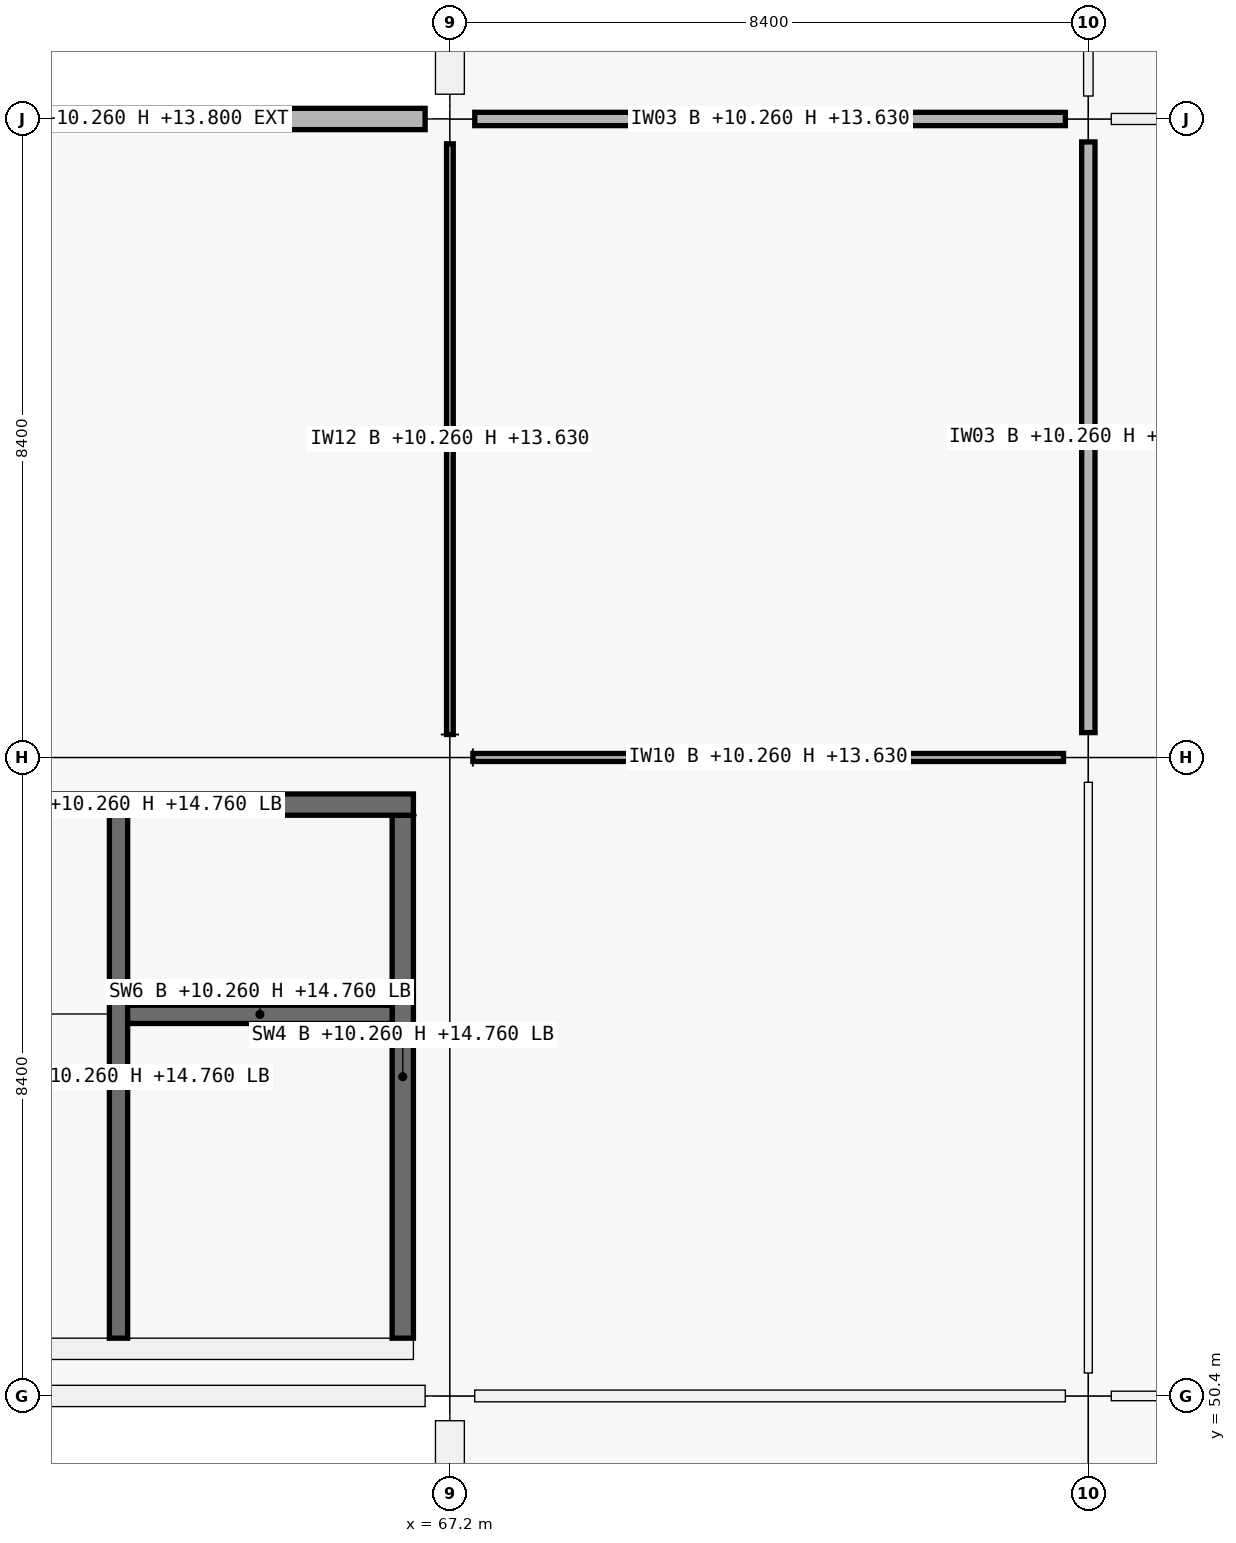
"""IFC4 building model, lengths in metres.
Left out: names, types, materials, properties, quantities, classifications, styles, units other than length and angle.
Written with IfcOpenShell. Run it as: python <this file> out.ifc"""

import sys

from ifc_helpers import new_model, si_unit, direction, frame, frame_2d, origin, origin_2d, place, context, subcontext, project, spatial, rectangle, extrude, element, fill, save


model = new_model("IFC4")
c1 = context("Model", 3, precision=1e-05, world=origin(), true_north=direction((0.0, 1.0)))
c2 = subcontext(c1, "Body", "Model", "MODEL_VIEW")
j1 = project(units=[si_unit("LENGTHUNIT", "METRE"), si_unit("PLANEANGLEUNIT", "RADIAN")], contexts=[c1])
p1 = place(None, origin())
s1 = spatial("IfcSite", under=j1, at=p1, CompositionType="ELEMENT")
p2 = place(p1, origin())
s2 = spatial("IfcBuilding", under=s1, at=p2, CompositionType="ELEMENT")
p3 = place(p2, frame((0.0, 0.0, 10.26)))
s3 = spatial("IfcBuildingStorey", under=s2, at=p3, CompositionType="ELEMENT", Elevation=10.26)
p4 = place(p3, frame((67.2, 50.4, 0.0), z_axis=(0.0, 0.0, 1.0), x_axis=(1.0, 0.0, 0.0)))
e1 = element("IfcColumn", 1, at=p4, inside=s3, PredefinedType="COLUMN", context=c2, shape_type="SweptSolid", body=[
    extrude(rectangle(XDim=0.65, YDim=0.65, at=origin_2d()), origin(), (0.0, 0.0, 1.0), 4.5),
])
p5 = place(p3, frame((67.2, 58.8, 0.0), z_axis=(0.0, 0.0, 1.0), x_axis=(1.0, 0.0, 0.0)))
e2 = element("IfcColumn", 2, at=p5, inside=s3, PredefinedType="COLUMN", context=c2, shape_type="SweptSolid", body=[
    extrude(rectangle(XDim=0.6, YDim=0.6, at=origin_2d()), origin(), (0.0, 0.0, 1.0), 4.5),
])
p6 = place(p3, frame((67.2, 67.2, 0.0), z_axis=(0.0, 0.0, 1.0), x_axis=(1.0, 0.0, 0.0)))
e3 = element("IfcColumn", 3, at=p6, inside=s3, PredefinedType="COLUMN", context=c2, shape_type="SweptSolid", body=[
    extrude(rectangle(XDim=0.65, YDim=0.65, at=origin_2d()), origin(), (0.0, 0.0, 1.0), 4.5),
])
p7 = place(p3, frame((75.6, 50.4, 0.0), z_axis=(0.0, 0.0, 1.0), x_axis=(1.0, 0.0, 0.0)))
e4 = element("IfcColumn", 4, at=p7, inside=s3, PredefinedType="COLUMN", context=c2, shape_type="SweptSolid", body=[
    extrude(rectangle(XDim=0.6, YDim=0.6, at=origin_2d()), origin(), (0.0, 0.0, 1.0), 4.5),
])
p8 = place(p3, frame((75.6, 58.8, -0.3), z_axis=(0.0, 0.0, 1.0), x_axis=(1.0, 0.0, 0.0)))
e5 = element("IfcColumn", 5, at=p8, inside=s3, PredefinedType="COLUMN", context=c2, shape_type="SweptSolid", body=[
    extrude(rectangle(XDim=0.65, YDim=0.65, at=origin_2d()), origin(), (0.0, 0.0, 1.0), 4.8),
])
p9 = place(p3, frame((75.6, 67.2, 0.0), z_axis=(0.0, 0.0, 1.0), x_axis=(1.0, 0.0, 0.0)))
e6 = element("IfcColumn", 6, at=p9, inside=s3, PredefinedType="COLUMN", context=c2, shape_type="SweptSolid", body=[
    extrude(rectangle(XDim=0.6, YDim=0.6, at=origin_2d()), origin(), (0.0, 0.0, 1.0), 4.5),
])
p10 = place(p3, frame((66.874, 50.4, 0.0), z_axis=(0.0, 0.0, 1.0), x_axis=(-1.0, 0.0, 0.0)))
e7 = element("IfcWall", 7, at=p10, inside=s3, PredefinedType="SOLIDWALL", context=c2, shape_type="SweptSolid", body=[
    extrude(rectangle(XDim=7.773, YDim=0.28, at=frame_2d((3.886, 0.0))), origin(), (0.0, 0.0, 1.0), 3.54),
])
p11 = place(p3, frame((59.151, 67.2, 0.0), z_axis=(0.0, 0.0, 1.0), x_axis=(1.0, 0.0, 0.0)))
e8 = element("IfcWall", 8, at=p11, inside=s3, PredefinedType="SOLIDWALL", context=c2, shape_type="SweptSolid", body=[
    extrude(rectangle(XDim=7.723, YDim=0.28, at=frame_2d((3.862, 0.0))), origin(), (0.0, 0.0, 1.0), 3.54),
])
p12 = place(p11, frame((2.261, 0.0, 0.9)))
e9 = element("IfcOpeningElement", 9, at=p12, cuts=e8, PredefinedType="OPENING", context=c2, shape_type="SweptSolid", body=[
    extrude(rectangle(XDim=3.2, YDim=1.75, at=frame_2d((1.6, 0.875))), frame((0.0, 0.14, 0.0), z_axis=(0.0, -1.0, 0.0), x_axis=(1.0, 0.0, 0.0)), (0.0, 0.0, 1.0), 0.28),
])
p13 = place(p3, frame((67.2, 42.301, 0.0), z_axis=(0.0, 0.0, 1.0), x_axis=(0.0, 1.0, 0.0)))
e10 = element("IfcWall", 10, at=p13, inside=s3, PredefinedType="SOLIDWALL", context=c2, shape_type="SweptSolid", body=[
    extrude(rectangle(XDim=7.773, YDim=0.38, at=frame_2d((3.886, 0.0))), origin(), (0.0, 0.0, 1.0), 3.54),
])
p14 = place(p3, frame((67.2, 67.526, 0.0), z_axis=(0.0, 0.0, 1.0), x_axis=(0.0, 1.0, 0.0)))
e11 = element("IfcWall", 11, at=p14, inside=s3, PredefinedType="SOLIDWALL", context=c2, shape_type="SweptSolid", body=[
    extrude(rectangle(XDim=7.773, YDim=0.38, at=frame_2d((3.887, 0.0))), origin(), (0.0, 0.0, 1.0), 3.54),
])
for number, where, z_axis, x_axis in (
    (12, (66.72, 51.02, 0.0), (0.0, 0.0, 1.0), (-1.0, 0.0, 0.0)),
    (13, (59.28, 58.18, 0.0), (0.0, 0.0, 1.0), (1.0, 0.0, 0.0)),
):
    element("IfcWall", number, at=place(p3, frame(where, z_axis=z_axis, x_axis=x_axis)), inside=s3, PredefinedType="SHEAR", context=c2, shape_type="SweptSolid", body=[
        extrude(rectangle(XDim=7.44, YDim=0.28, at=frame_2d((3.72, 0.0))), origin(), (0.0, 0.0, 1.0), 4.5),
    ])
p15 = place(p3, frame((66.58, 58.04, 0.0), z_axis=(0.0, 0.0, 1.0), x_axis=(0.0, -1.0, 0.0)))
e14 = element("IfcWall", 14, at=p15, inside=s3, PredefinedType="SHEAR", context=c2, shape_type="SweptSolid", body=[
    extrude(rectangle(XDim=6.88, YDim=0.28, at=frame_2d((3.44, 0.0))), origin(), (0.0, 0.0, 1.0), 4.5),
])
p16 = place(p15, frame((3.99, 0.0, 0.0)))
e15 = element("IfcOpeningElement", 15, at=p16, cuts=e14, PredefinedType="OPENING", context=c2, shape_type="SweptSolid", body=[
    extrude(rectangle(XDim=1.5, YDim=2.15, at=frame_2d((0.75, 1.075))), frame((0.0, 0.14, 0.0), z_axis=(0.0, -1.0, 0.0), x_axis=(1.0, 0.0, 0.0)), (0.0, 0.0, 1.0), 0.28),
])
p17 = place(p3, frame((62.84, 51.16, 0.0), z_axis=(0.0, 0.0, 1.0), x_axis=(0.0, 1.0, 0.0)))
e16 = element("IfcWall", 16, at=p17, inside=s3, PredefinedType="SHEAR", context=c2, shape_type="SweptSolid", body=[
    extrude(rectangle(XDim=6.88, YDim=0.24, at=frame_2d((3.44, 0.0))), origin(), (0.0, 0.0, 1.0), 4.5),
])
p18 = place(p17, frame((0.12, 0.0, 0.0)))
e17 = element("IfcOpeningElement", 17, at=p18, cuts=e16, PredefinedType="OPENING", context=c2, shape_type="SweptSolid", body=[
    extrude(rectangle(XDim=1.0, YDim=2.15, at=frame_2d((0.5, 1.075))), frame((0.0, 0.12, 0.0), z_axis=(0.0, -1.0, 0.0), x_axis=(1.0, 0.0, 0.0)), (0.0, 0.0, 1.0), 0.24),
])
p19 = place(p3, frame((62.96, 55.42, 0.0), z_axis=(0.0, 0.0, 1.0), x_axis=(1.0, 0.0, 0.0)))
e18 = element("IfcWall", 18, at=p19, inside=s3, PredefinedType="SHEAR", context=c2, shape_type="SweptSolid", body=[
    extrude(rectangle(XDim=3.48, YDim=0.24, at=frame_2d((1.74, 0.0))), origin(), (0.0, 0.0, 1.0), 4.5),
])
p20 = place(p19, frame((1.19, 0.0, 0.0)))
e19 = element("IfcOpeningElement", 19, at=p20, cuts=e18, PredefinedType="OPENING", context=c2, shape_type="SweptSolid", body=[
    extrude(rectangle(XDim=1.1, YDim=2.15, at=frame_2d((0.55, 1.075))), frame((0.0, 0.12, 0.0), z_axis=(0.0, -1.0, 0.0), x_axis=(1.0, 0.0, 0.0)), (0.0, 0.0, 1.0), 0.24),
])
p21 = place(p3, frame((67.527, 50.4, 0.0), z_axis=(0.0, 0.0, 1.0), x_axis=(1.0, 0.0, 0.0)))
e20 = element("IfcWall", 20, at=p21, inside=s3, PredefinedType="PARTITIONING", context=c2, shape_type="SweptSolid", body=[
    extrude(rectangle(XDim=7.771, YDim=0.155, at=frame_2d((3.885, 0.0))), origin(), (0.0, 0.0, 1.0), 3.37),
])
p22 = place(p21, frame((2.986, 0.0, 0.0)))
e21 = element("IfcOpeningElement", 21, at=p22, cuts=e20, PredefinedType="OPENING", context=c2, shape_type="SweptSolid", body=[
    extrude(rectangle(XDim=1.8, YDim=2.4, at=frame_2d((0.9, 1.2))), frame((0.0, 0.078, 0.0), z_axis=(0.0, -1.0, 0.0), x_axis=(1.0, 0.0, 0.0)), (0.0, 0.0, 1.0), 0.155),
])
p23 = place(p3, frame((67.502, 58.8, 0.0), z_axis=(0.0, 0.0, 1.0), x_axis=(1.0, 0.0, 0.0)))
e22 = element("IfcWall", 22, at=p23, inside=s3, PredefinedType="PARTITIONING", context=c2, shape_type="SweptSolid", body=[
    extrude(rectangle(XDim=7.771, YDim=0.105, at=frame_2d((3.885, 0.0))), origin(), (0.0, 0.0, 1.0), 3.37),
])
p24 = place(p23, frame((3.035, 0.0, 0.0)))
e23 = element("IfcOpeningElement", 23, at=p24, cuts=e22, PredefinedType="OPENING", context=c2, shape_type="SweptSolid", body=[
    extrude(rectangle(XDim=1.7, YDim=2.35, at=frame_2d((0.85, 1.175))), frame((0.0, 0.052, 0.0), z_axis=(0.0, -1.0, 0.0), x_axis=(1.0, 0.0, 0.0)), (0.0, 0.0, 1.0), 0.105),
])
p25 = place(p3, frame((67.527, 67.2, 0.0), z_axis=(0.0, 0.0, 1.0), x_axis=(1.0, 0.0, 0.0)))
e24 = element("IfcWall", 24, at=p25, inside=s3, PredefinedType="PARTITIONING", context=c2, shape_type="SweptSolid", body=[
    extrude(rectangle(XDim=7.771, YDim=0.175, at=frame_2d((3.885, 0.0))), origin(), (0.0, 0.0, 1.0), 3.37),
])
p26 = place(p25, frame((3.085, 0.0, 0.0)))
e25 = element("IfcOpeningElement", 25, at=p26, cuts=e24, PredefinedType="OPENING", context=c2, shape_type="SweptSolid", body=[
    extrude(rectangle(XDim=1.6, YDim=2.3, at=frame_2d((0.8, 1.15))), frame((0.0, 0.087, 0.0), z_axis=(0.0, -1.0, 0.0), x_axis=(1.0, 0.0, 0.0)), (0.0, 0.0, 1.0), 0.175),
])
p27 = place(p3, frame((75.902, 50.4, 0.0), z_axis=(0.0, 0.0, 1.0), x_axis=(1.0, 0.0, 0.0)))
e26 = element("IfcWall", 26, at=p27, inside=s3, PredefinedType="PARTITIONING", context=c2, shape_type="SweptSolid", body=[
    extrude(rectangle(XDim=7.771, YDim=0.125, at=frame_2d((3.885, 0.0))), origin(), (0.0, 0.0, 1.0), 3.37),
])
p28 = place(p27, frame((3.135, 0.0, 0.0)))
e27 = element("IfcOpeningElement", 27, at=p28, cuts=e26, PredefinedType="OPENING", context=c2, shape_type="SweptSolid", body=[
    extrude(rectangle(XDim=1.5, YDim=2.25, at=frame_2d((0.75, 1.125))), frame((0.0, 0.062, 0.0), z_axis=(0.0, -1.0, 0.0), x_axis=(1.0, 0.0, 0.0)), (0.0, 0.0, 1.0), 0.125),
])
p29 = place(p3, frame((75.902, 67.2, 0.0), z_axis=(0.0, 0.0, 1.0), x_axis=(1.0, 0.0, 0.0)))
e28 = element("IfcWall", 28, at=p29, inside=s3, PredefinedType="PARTITIONING", context=c2, shape_type="SweptSolid", body=[
    extrude(rectangle(XDim=7.771, YDim=0.145, at=frame_2d((3.885, 0.0))), origin(), (0.0, 0.0, 1.0), 3.37),
])
p30 = place(p29, frame((3.16, 0.0, 0.0)))
e29 = element("IfcOpeningElement", 29, at=p30, cuts=e28, PredefinedType="OPENING", context=c2, shape_type="SweptSolid", body=[
    extrude(rectangle(XDim=1.45, YDim=2.2, at=frame_2d((0.725, 1.1))), frame((0.0, 0.073, 0.0), z_axis=(0.0, -1.0, 0.0), x_axis=(1.0, 0.0, 0.0)), (0.0, 0.0, 1.0), 0.145),
])
p31 = place(p3, frame((67.2, 59.102, 0.0), z_axis=(0.0, 0.0, 1.0), x_axis=(0.0, 1.0, 0.0)))
e30 = element("IfcWall", 30, at=p31, inside=s3, PredefinedType="PARTITIONING", context=c2, shape_type="SweptSolid", body=[
    extrude(rectangle(XDim=7.771, YDim=0.088, at=frame_2d((3.885, 0.0))), origin(), (0.0, 0.0, 1.0), 3.37),
])
p32 = place(p31, frame((3.415, 0.0, 0.0)))
e31 = element("IfcOpeningElement", 31, at=p32, cuts=e30, PredefinedType="OPENING", context=c2, shape_type="SweptSolid", body=[
    extrude(rectangle(XDim=0.94, YDim=2.15, at=frame_2d((0.47, 1.075))), frame((0.0, 0.044, 0.0), z_axis=(0.0, -1.0, 0.0), x_axis=(1.0, 0.0, 0.0)), (0.0, 0.0, 1.0), 0.088),
])
p33 = place(p3, frame((75.6, 50.702, 0.0), z_axis=(0.0, 0.0, 1.0), x_axis=(0.0, 1.0, 0.0)))
e32 = element("IfcWall", 32, at=p33, inside=s3, PredefinedType="PARTITIONING", context=c2, shape_type="SweptSolid", body=[
    extrude(rectangle(XDim=7.771, YDim=0.105, at=frame_2d((3.885, 0.0))), origin(), (0.0, 0.0, 1.0), 3.37),
])
p34 = place(p33, frame((3.21, 0.0, 0.0)))
e33 = element("IfcOpeningElement", 33, at=p34, cuts=e32, PredefinedType="OPENING", context=c2, shape_type="SweptSolid", body=[
    extrude(rectangle(XDim=1.35, YDim=2.2, at=frame_2d((0.675, 1.1))), frame((0.0, 0.052, 0.0), z_axis=(0.0, -1.0, 0.0), x_axis=(1.0, 0.0, 0.0)), (0.0, 0.0, 1.0), 0.105),
])
p35 = place(p3, frame((75.6, 59.127, 0.0), z_axis=(0.0, 0.0, 1.0), x_axis=(0.0, 1.0, 0.0)))
e34 = element("IfcWall", 34, at=p35, inside=s3, PredefinedType="PARTITIONING", context=c2, shape_type="SweptSolid", body=[
    extrude(rectangle(XDim=7.771, YDim=0.175, at=frame_2d((3.885, 0.0))), origin(), (0.0, 0.0, 1.0), 3.37),
])
p36 = place(p35, frame((2.986, 0.0, 0.0)))
e35 = element("IfcOpeningElement", 35, at=p36, cuts=e34, PredefinedType="OPENING", context=c2, shape_type="SweptSolid", body=[
    extrude(rectangle(XDim=1.8, YDim=2.4, at=frame_2d((0.9, 1.2))), frame((0.0, 0.087, 0.0), z_axis=(0.0, -1.0, 0.0), x_axis=(1.0, 0.0, 0.0)), (0.0, 0.0, 1.0), 0.175),
])
p37 = place(p3, frame((75.6, 67.502, 0.0), z_axis=(0.0, 0.0, 1.0), x_axis=(0.0, 1.0, 0.0)))
e36 = element("IfcWall", 36, at=p37, inside=s3, PredefinedType="PARTITIONING", context=c2, shape_type="SweptSolid", body=[
    extrude(rectangle(XDim=7.771, YDim=0.125, at=frame_2d((3.885, 0.0))), origin(), (0.0, 0.0, 1.0), 3.37),
])
p38 = place(p37, frame((3.425, 0.0, 0.0)))
e37 = element("IfcOpeningElement", 37, at=p38, cuts=e36, PredefinedType="OPENING", context=c2, shape_type="SweptSolid", body=[
    extrude(rectangle(XDim=0.92, YDim=2.15, at=frame_2d((0.46, 1.075))), frame((0.0, 0.062, 0.0), z_axis=(0.0, -1.0, 0.0), x_axis=(1.0, 0.0, 0.0)), (0.0, 0.0, 1.0), 0.125),
])
p39 = place(p12, origin())
e38 = element("IfcWindow", 38, at=p39, inside=s3, PartitioningType="SINGLE_PANEL", PredefinedType="WINDOW", context=c2, shape_type="SweptSolid", body=[
    extrude(rectangle(XDim=3.2, YDim=1.75, at=frame_2d((1.6, 0.875))), frame((0.0, 0.03, 0.0), z_axis=(0.0, -1.0, 0.0), x_axis=(1.0, 0.0, 0.0)), (0.0, 0.0, 1.0), 0.06),
])
fill(e9, e38)
p40 = place(p18, origin())
e39 = element("IfcDoor", 39, at=p40, inside=s3, OperationType="SINGLE_SWING_RIGHT", PredefinedType="DOOR", context=c2, shape_type="SweptSolid", body=[
    extrude(rectangle(XDim=1.0, YDim=2.15, at=frame_2d((0.5, 1.075))), frame((0.0, 0.025, 0.0), z_axis=(0.0, -1.0, 0.0), x_axis=(1.0, 0.0, 0.0)), (0.0, 0.0, 1.0), 0.05),
])
fill(e17, e39)
p41 = place(p16, origin())
e40 = element("IfcDoor", 40, at=p41, inside=s3, OperationType="DOUBLE_DOOR_SINGLE_SWING", PredefinedType="DOOR", context=c2, shape_type="SweptSolid", body=[
    extrude(rectangle(XDim=1.5, YDim=2.15, at=frame_2d((0.75, 1.075))), frame((0.0, 0.025, 0.0), z_axis=(0.0, -1.0, 0.0), x_axis=(1.0, 0.0, 0.0)), (0.0, 0.0, 1.0), 0.05),
])
fill(e15, e40)
p42 = place(p20, origin())
e41 = element("IfcDoor", 41, at=p42, inside=s3, OperationType="DOUBLE_DOOR_SLIDING", PredefinedType="DOOR", context=c2, shape_type="SweptSolid", body=[
    extrude(rectangle(XDim=1.1, YDim=2.15, at=frame_2d((0.55, 1.075))), frame((0.0, 0.025, 0.0), z_axis=(0.0, -1.0, 0.0), x_axis=(1.0, 0.0, 0.0)), (0.0, 0.0, 1.0), 0.05),
])
fill(e19, e41)
p43 = place(p22, origin())
e42 = element("IfcDoor", 42, at=p43, inside=s3, OperationType="DOUBLE_DOOR_SINGLE_SWING", PredefinedType="DOOR", context=c2, shape_type="SweptSolid", body=[
    extrude(rectangle(XDim=1.8, YDim=2.4, at=frame_2d((0.9, 1.2))), frame((0.0, 0.025, 0.0), z_axis=(0.0, -1.0, 0.0), x_axis=(1.0, 0.0, 0.0)), (0.0, 0.0, 1.0), 0.05),
])
fill(e21, e42)
p44 = place(p24, origin())
e43 = element("IfcDoor", 43, at=p44, inside=s3, OperationType="DOUBLE_DOOR_SINGLE_SWING", PredefinedType="DOOR", context=c2, shape_type="SweptSolid", body=[
    extrude(rectangle(XDim=1.7, YDim=2.35, at=frame_2d((0.85, 1.175))), frame((0.0, 0.025, 0.0), z_axis=(0.0, -1.0, 0.0), x_axis=(1.0, 0.0, 0.0)), (0.0, 0.0, 1.0), 0.05),
])
fill(e23, e43)
p45 = place(p26, origin())
e44 = element("IfcDoor", 44, at=p45, inside=s3, OperationType="DOUBLE_DOOR_SINGLE_SWING", PredefinedType="DOOR", context=c2, shape_type="SweptSolid", body=[
    extrude(rectangle(XDim=1.6, YDim=2.3, at=frame_2d((0.8, 1.15))), frame((0.0, 0.025, 0.0), z_axis=(0.0, -1.0, 0.0), x_axis=(1.0, 0.0, 0.0)), (0.0, 0.0, 1.0), 0.05),
])
fill(e25, e44)
p46 = place(p34, origin())
e45 = element("IfcDoor", 45, at=p46, inside=s3, OperationType="DOUBLE_DOOR_SINGLE_SWING", PredefinedType="DOOR", context=c2, shape_type="SweptSolid", body=[
    extrude(rectangle(XDim=1.35, YDim=2.2, at=frame_2d((0.675, 1.1))), frame((0.0, 0.025, 0.0), z_axis=(0.0, -1.0, 0.0), x_axis=(1.0, 0.0, 0.0)), (0.0, 0.0, 1.0), 0.05),
])
fill(e33, e45)
p47 = place(p36, origin())
e46 = element("IfcDoor", 46, at=p47, inside=s3, OperationType="DOUBLE_DOOR_SINGLE_SWING", PredefinedType="DOOR", context=c2, shape_type="SweptSolid", body=[
    extrude(rectangle(XDim=1.8, YDim=2.4, at=frame_2d((0.9, 1.2))), frame((0.0, 0.025, 0.0), z_axis=(0.0, -1.0, 0.0), x_axis=(1.0, 0.0, 0.0)), (0.0, 0.0, 1.0), 0.05),
])
fill(e35, e46)
p48 = place(p32, origin())
e47 = element("IfcDoor", 47, at=p48, inside=s3, OperationType="SINGLE_SWING_RIGHT", PredefinedType="DOOR", context=c2, shape_type="SweptSolid", body=[
    extrude(rectangle(XDim=0.94, YDim=2.15, at=frame_2d((0.47, 1.075))), frame((0.0, 0.025, 0.0), z_axis=(0.0, -1.0, 0.0), x_axis=(1.0, 0.0, 0.0)), (0.0, 0.0, 1.0), 0.05),
])
fill(e31, e47)
save(model, sys.argv[1])
